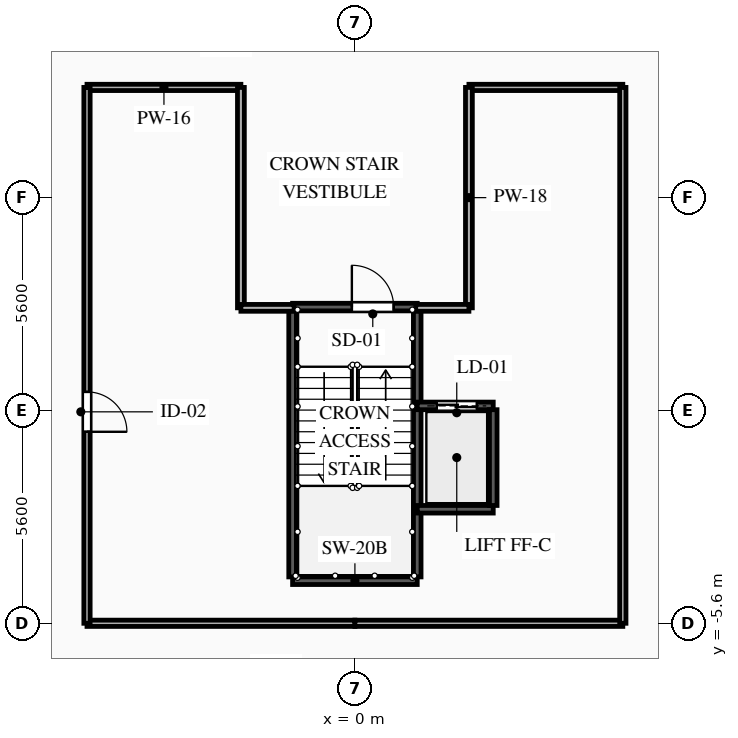
"""IFC4 building model, lengths in metres.
Left out: names, types, materials, properties, quantities, classifications, styles, units other than length and angle.
Written with IfcOpenShell. Run it as: python <this file> out.ifc"""

import sys

from ifc_helpers import new_model, si_unit, direction, frame, frame_2d, origin, place, context, subcontext, project, spatial, rectangle, extrude, element, fill, save


model = new_model("IFC4")
c1 = context("Model", 3, precision=1e-05, world=origin(), true_north=direction((0.0, 1.0)))
c2 = subcontext(c1, "Body", "Model", "MODEL_VIEW")
j1 = project(units=[si_unit("LENGTHUNIT", "METRE"), si_unit("PLANEANGLEUNIT", "RADIAN")], contexts=[c1])
p1 = place(None, origin())
s1 = spatial("IfcSite", under=j1, at=p1, CompositionType="ELEMENT")
p2 = place(p1, origin())
s2 = spatial("IfcBuilding", under=s1, at=p2, CompositionType="ELEMENT")
p3 = place(p2, frame((0.0, 0.0, 266.0)))
s3 = spatial("IfcBuildingStorey", under=s2, at=p3, CompositionType="ELEMENT", Elevation=266.0)
p4 = place(p3, frame((-1.64, 2.72, 0.0), z_axis=(0.0, 0.0, 1.0), x_axis=(1.0, 0.0, 0.0)))
e1 = element("IfcWall", 1, at=p4, inside=s3, PredefinedType="SHEAR", context=c2, shape_type="SweptSolid", body=[
    extrude(rectangle(XDim=3.28, YDim=0.2, at=frame_2d((1.64, 0.0))), origin(), (0.0, 0.0, 1.0), 3.8),
])
p5 = place(p4, frame((1.56, 0.0, 0.0)))
e2 = element("IfcOpeningElement", 2, at=p5, cuts=e1, PredefinedType="OPENING", context=c2, shape_type="SweptSolid", body=[
    extrude(rectangle(XDim=1.1, YDim=2.15, at=frame_2d((0.55, 1.075))), frame((0.0, 0.11, 0.0), z_axis=(0.0, -1.0, 0.0), x_axis=(1.0, 0.0, 0.0)), (0.0, 0.0, 1.0), 0.22),
])
p6 = place(p3, frame((-1.64, -4.48, 0.0), z_axis=(0.0, 0.0, 1.0), x_axis=(1.0, 0.0, 0.0)))
e3 = element("IfcWall", 3, at=p6, inside=s3, PredefinedType="SHEAR", context=c2, shape_type="SweptSolid", body=[
    extrude(rectangle(XDim=3.28, YDim=0.2, at=frame_2d((1.64, 0.0))), origin(), (0.0, 0.0, 1.0), 3.8),
])
for number, where, z_axis, x_axis in (
    (4, (-1.64, -4.38, 0.0), (0.0, 0.0, 1.0), (0.0, 1.0, 0.0)),
    (5, (1.64, -4.38, 0.0), (0.0, 0.0, 1.0), (0.0, 1.0, 0.0)),
):
    element("IfcWall", number, at=place(p3, frame(where, z_axis=z_axis, x_axis=x_axis)), inside=s3, PredefinedType="SHEAR", context=c2, shape_type="SweptSolid", body=[
        extrude(rectangle(XDim=7.0, YDim=0.2, at=frame_2d((3.5, 0.0))), origin(), (0.0, 0.0, 1.0), 3.8),
    ])
p7 = place(p3, frame((1.64, 0.12, 0.0), z_axis=(0.0, 0.0, 1.0), x_axis=(1.0, 0.0, 0.0)))
e6 = element("IfcWall", 6, at=p7, inside=s3, PredefinedType="SHEAR", context=c2, shape_type="SweptSolid", body=[
    extrude(rectangle(XDim=2.0, YDim=0.2, at=frame_2d((1.0, 0.0))), origin(), (0.0, 0.0, 1.0), 3.8),
])
p8 = place(p7, frame((0.515, 0.0, 0.0)))
e7 = element("IfcOpeningElement", 7, at=p8, cuts=e6, PredefinedType="OPENING", context=c2, shape_type="SweptSolid", body=[
    extrude(rectangle(XDim=1.05, YDim=2.1, at=frame_2d((0.525, 1.05))), frame((0.0, 0.11, 0.0), z_axis=(0.0, -1.0, 0.0), x_axis=(1.0, 0.0, 0.0)), (0.0, 0.0, 1.0), 0.22),
])
p9 = place(p3, frame((1.64, -2.6, 0.0), z_axis=(0.0, 0.0, 1.0), x_axis=(1.0, 0.0, 0.0)))
e8 = element("IfcWall", 8, at=p9, inside=s3, PredefinedType="SHEAR", context=c2, shape_type="SweptSolid", body=[
    extrude(rectangle(XDim=2.0, YDim=0.2, at=frame_2d((1.0, 0.0))), origin(), (0.0, 0.0, 1.0), 3.8),
])
p10 = place(p3, frame((3.64, -2.5, 0.0), z_axis=(0.0, 0.0, 1.0), x_axis=(0.0, 1.0, 0.0)))
e9 = element("IfcWall", 9, at=p10, inside=s3, PredefinedType="SHEAR", context=c2, shape_type="SweptSolid", body=[
    extrude(rectangle(XDim=2.52, YDim=0.2, at=frame_2d((1.26, 0.0))), origin(), (0.0, 0.0, 1.0), 3.8),
])
for number, where, z_axis, x_axis in (
    (10, (-3.0, 8.5, 0.0), (0.0, 0.0, 1.0), (-1.0, 0.0, 0.0)),
    (11, (7.05, 8.5, 0.0), (0.0, 0.0, 1.0), (-1.0, 0.0, 0.0)),
):
    element("IfcWall", number, at=place(p3, frame(where, z_axis=z_axis, x_axis=x_axis)), inside=s3, PredefinedType="PARTITIONING", context=c2, shape_type="SweptSolid", body=[
        extrude(rectangle(XDim=4.05, YDim=0.165, at=frame_2d((2.025, 0.0))), origin(), (0.0, 0.0, 1.0), 3.8),
    ])
for number, where, z_axis, x_axis in (
    (12, (-7.05, -5.6, 0.0), (0.0, 0.0, 1.0), (1.0, 0.0, 0.0)),
    (13, (0.0, -5.6, 0.0), (0.0, 0.0, 1.0), (1.0, 0.0, 0.0)),
):
    element("IfcWall", number, at=place(p3, frame(where, z_axis=z_axis, x_axis=x_axis)), inside=s3, PredefinedType="PARTITIONING", context=c2, shape_type="SweptSolid", body=[
        extrude(rectangle(XDim=7.05, YDim=0.165, at=frame_2d((3.525, 0.0))), origin(), (0.0, 0.0, 1.0), 3.285),
    ])
p11 = place(p3, frame((-7.05, 8.5, 0.0), z_axis=(0.0, 0.0, 1.0), x_axis=(0.0, -1.0, 0.0)))
e14 = element("IfcWall", 14, at=p11, inside=s3, PredefinedType="PARTITIONING", context=c2, shape_type="SweptSolid", body=[
    extrude(rectangle(XDim=14.1, YDim=0.165, at=frame_2d((7.05, 0.0))), origin(), (0.0, 0.0, 1.0), 3.8),
])
p12 = place(p11, frame((8.011, 0.0, 0.0)))
e15 = element("IfcOpeningElement", 15, at=p12, cuts=e14, PredefinedType="OPENING", context=c2, shape_type="SweptSolid", body=[
    extrude(rectangle(XDim=1.05, YDim=2.15, at=frame_2d((0.525, 1.075))), frame((0.0, 0.093, 0.0), z_axis=(0.0, -1.0, 0.0), x_axis=(1.0, 0.0, 0.0)), (0.0, 0.0, 1.0), 0.185),
])
p13 = place(p3, frame((7.05, -5.6, 0.0), z_axis=(0.0, 0.0, 1.0), x_axis=(0.0, 1.0, 0.0)))
e16 = element("IfcWall", 16, at=p13, inside=s3, PredefinedType="PARTITIONING", context=c2, shape_type="SweptSolid", body=[
    extrude(rectangle(XDim=14.1, YDim=0.165, at=frame_2d((7.05, 0.0))), origin(), (0.0, 0.0, 1.0), 3.8),
])
for number, where, z_axis, x_axis in (
    (17, (3.0, 8.5, 0.0), (0.0, 0.0, 1.0), (0.0, -1.0, 0.0)),
    (18, (-3.0, 2.7, 0.0), (0.0, 0.0, 1.0), (0.0, 1.0, 0.0)),
):
    element("IfcWall", number, at=place(p3, frame(where, z_axis=z_axis, x_axis=x_axis)), inside=s3, PredefinedType="PARTITIONING", context=c2, shape_type="SweptSolid", body=[
        extrude(rectangle(XDim=5.8, YDim=0.18, at=frame_2d((2.9, 0.0))), origin(), (0.0, 0.0, 1.0), 3.8),
    ])
for number, where, z_axis, x_axis in (
    (19, (3.0, 2.7, 0.0), (0.0, 0.0, 1.0), (-1.0, 0.0, 0.0)),
    (20, (-1.6, 2.7, 0.0), (0.0, 0.0, 1.0), (-1.0, 0.0, 0.0)),
):
    element("IfcWall", number, at=place(p3, frame(where, z_axis=z_axis, x_axis=x_axis)), inside=s3, PredefinedType="PARTITIONING", context=c2, shape_type="SweptSolid", body=[
        extrude(rectangle(XDim=1.4, YDim=0.18, at=frame_2d((0.7, 0.0))), origin(), (0.0, 0.0, 1.0), 3.8),
    ])
p14 = place(p5, origin())
e21 = element("IfcDoor", 21, at=p14, inside=s3, OperationType="SINGLE_SWING_LEFT", PredefinedType="DOOR", context=c2, shape_type="SweptSolid", body=[
    extrude(rectangle(XDim=1.1, YDim=2.15, at=frame_2d((0.55, 1.075))), frame((0.0, 0.025, 0.0), z_axis=(0.0, -1.0, 0.0), x_axis=(1.0, 0.0, 0.0)), (0.0, 0.0, 1.0), 0.05),
])
fill(e2, e21)
p15 = place(p8, origin())
e22 = element("IfcDoor", 22, at=p15, inside=s3, OperationType="DOUBLE_DOOR_SLIDING", PredefinedType="DOOR", context=c2, shape_type="SweptSolid", body=[
    extrude(rectangle(XDim=1.05, YDim=2.1, at=frame_2d((0.525, 1.05))), frame((0.0, 0.025, 0.0), z_axis=(0.0, -1.0, 0.0), x_axis=(1.0, 0.0, 0.0)), (0.0, 0.0, 1.0), 0.05),
])
fill(e7, e22)
p16 = place(p12, origin())
e23 = element("IfcDoor", 23, at=p16, inside=s3, OperationType="SINGLE_SWING_RIGHT", PredefinedType="DOOR", context=c2, shape_type="SweptSolid", body=[
    extrude(rectangle(XDim=1.05, YDim=2.15, at=frame_2d((0.525, 1.075))), frame((0.0, 0.025, 0.0), z_axis=(0.0, -1.0, 0.0), x_axis=(1.0, 0.0, 0.0)), (0.0, 0.0, 1.0), 0.05),
])
fill(e15, e23)
save(model, sys.argv[1])
